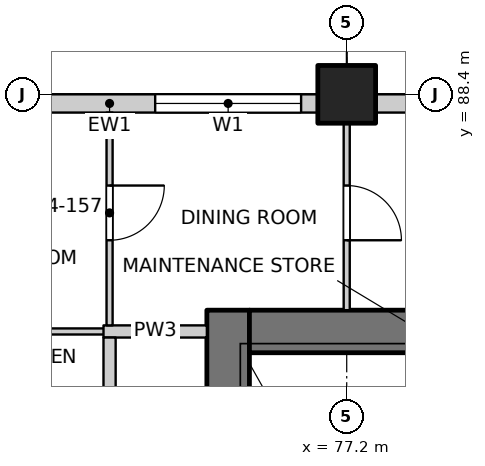
"""IFC4 building model, lengths in metres.
Left out: names, types, materials, properties, quantities, classifications, styles, units other than length and angle.
Written with IfcOpenShell. Run it as: python <this file> out.ifc"""

import sys

from ifc_helpers import new_model, si_unit, direction, frame, frame_2d, origin, origin_2d, place, context, subcontext, project, spatial, rectangle, extrude, element, fill, save


model = new_model("IFC4")
c1 = context("Model", 3, precision=1e-05, world=origin(), true_north=direction((0.0, 1.0)))
c2 = subcontext(c1, "Body", "Model", "MODEL_VIEW")
j1 = project(units=[si_unit("LENGTHUNIT", "METRE"), si_unit("PLANEANGLEUNIT", "RADIAN")], contexts=[c1])
p1 = place(None, origin())
s1 = spatial("IfcSite", under=j1, at=p1, CompositionType="ELEMENT")
p2 = place(p1, origin())
s2 = spatial("IfcBuilding", under=s1, at=p2, CompositionType="ELEMENT")
p3 = place(p2, frame((0.0, 0.0, 58.0)))
s3 = spatial("IfcBuildingStorey", under=s2, at=p3, CompositionType="ELEMENT", Elevation=58.0)
p4 = place(p3, frame((77.2, 88.4, -0.25), z_axis=(0.0, 0.0, 1.0), x_axis=(1.0, 0.0, 0.0)))
e1 = element("IfcColumn", 1, at=p4, inside=s3, PredefinedType="COLUMN", context=c2, shape_type="SweptSolid", body=[
    extrude(rectangle(XDim=0.95, YDim=0.95, at=origin_2d()), origin(), (0.0, 0.0, 1.0), 3.4),
])
p5 = place(p3, frame((75.25, 77.3, -0.25), z_axis=(0.0, 0.0, 1.0), x_axis=(0.0, 1.0, 0.0)))
e2 = element("IfcWall", 2, at=p5, inside=s3, PredefinedType="SOLIDWALL", context=c2, shape_type="SweptSolid", body=[
    extrude(rectangle(XDim=7.55, YDim=0.7, at=frame_2d((3.775, 0.0))), origin(), (0.0, 0.0, 1.0), 3.4),
])
p6 = place(p5, frame((0.3, 0.0, 0.25)))
e3 = element("IfcOpeningElement", 3, at=p6, cuts=e2, PredefinedType="OPENING", context=c2, shape_type="SweptSolid", body=[
    extrude(rectangle(XDim=1.2, YDim=2.1, at=frame_2d((0.6, 1.05))), frame((0.0, 0.36, 0.0), z_axis=(0.0, -1.0, 0.0), x_axis=(1.0, 0.0, 0.0)), (0.0, 0.0, 1.0), 0.72),
])
p7 = place(p3, frame((75.6, 84.5, -0.25), z_axis=(0.0, 0.0, 1.0), x_axis=(1.0, 0.0, 0.0)))
e4 = element("IfcWall", 4, at=p7, inside=s3, PredefinedType="SOLIDWALL", context=c2, shape_type="SweptSolid", body=[
    extrude(rectangle(XDim=18.8, YDim=0.7, at=frame_2d((9.4, 0.0))), origin(), (0.0, 0.0, 1.0), 3.4),
])
p8 = place(p3, frame((69.875, 88.25, 0.0), z_axis=(0.0, 0.0, 1.0), x_axis=(1.0, 0.0, 0.0)))
e5 = element("IfcWall", 5, at=p8, inside=s3, PredefinedType="SOLIDWALL", context=c2, shape_type="SweptSolid", body=[
    extrude(rectangle(XDim=6.85, YDim=0.3, at=frame_2d((3.425, 0.0))), origin(), (0.0, 0.0, 1.0), 2.7),
])
p9 = place(p8, frame((0.575, 0.0, 0.0)))
e6 = element("IfcOpeningElement", 6, at=p9, cuts=e5, PredefinedType="OPENING", context=c2, shape_type="SweptSolid", body=[
    extrude(rectangle(XDim=1.8, YDim=2.4, at=frame_2d((0.9, 1.2))), frame((0.0, 0.16, 0.0), z_axis=(0.0, -1.0, 0.0), x_axis=(1.0, 0.0, 0.0)), (0.0, 0.0, 1.0), 0.32),
])
p10 = place(p8, frame((4.175, 0.0, 0.9)))
e7 = element("IfcOpeningElement", 7, at=p10, cuts=e5, PredefinedType="OPENING", context=c2, shape_type="SweptSolid", body=[
    extrude(rectangle(XDim=2.4, YDim=1.8, at=frame_2d((1.2, 0.9))), frame((0.0, 0.16, 0.0), z_axis=(0.0, -1.0, 0.0), x_axis=(1.0, 0.0, 0.0)), (0.0, 0.0, 1.0), 0.32),
])
p11 = place(p3, frame((77.675, 88.25, 0.0), z_axis=(0.0, 0.0, 1.0), x_axis=(1.0, 0.0, 0.0)))
e8 = element("IfcWall", 8, at=p11, inside=s3, PredefinedType="SOLIDWALL", context=c2, shape_type="SweptSolid", body=[
    extrude(rectangle(XDim=6.85, YDim=0.3, at=frame_2d((3.425, 0.0))), origin(), (0.0, 0.0, 1.0), 2.7),
])
p12 = place(p11, frame((0.575, 0.0, 0.0)))
e9 = element("IfcOpeningElement", 9, at=p12, cuts=e8, PredefinedType="OPENING", context=c2, shape_type="SweptSolid", body=[
    extrude(rectangle(XDim=1.8, YDim=2.4, at=frame_2d((0.9, 1.2))), frame((0.0, 0.16, 0.0), z_axis=(0.0, -1.0, 0.0), x_axis=(1.0, 0.0, 0.0)), (0.0, 0.0, 1.0), 0.32),
])
p13 = place(p11, frame((4.175, 0.0, 0.9)))
e10 = element("IfcOpeningElement", 10, at=p13, cuts=e8, PredefinedType="OPENING", context=c2, shape_type="SweptSolid", body=[
    extrude(rectangle(XDim=2.4, YDim=1.8, at=frame_2d((1.2, 0.9))), frame((0.0, 0.16, 0.0), z_axis=(0.0, -1.0, 0.0), x_axis=(1.0, 0.0, 0.0)), (0.0, 0.0, 1.0), 0.32),
])
p14 = place(p3, frame((61.9, 84.5, 0.0), z_axis=(0.0, 0.0, 1.0), x_axis=(1.0, 0.0, 0.0)))
e11 = element("IfcWall", 11, at=p14, inside=s3, PredefinedType="PARTITIONING", context=c2, shape_type="SweptSolid", body=[
    extrude(rectangle(XDim=11.5, YDim=0.1, at=frame_2d((5.75, 0.0))), origin(), (0.0, 0.0, 1.0), 3.15),
])
p15 = place(p14, frame((7.965, 0.0, 0.0)))
e12 = element("IfcOpeningElement", 12, at=p15, cuts=e11, PredefinedType="OPENING", context=c2, shape_type="SweptSolid", body=[
    extrude(rectangle(XDim=0.9, YDim=2.1, at=frame_2d((0.45, 1.05))), frame((0.0, 0.06, 0.0), z_axis=(0.0, -1.0, 0.0), x_axis=(1.0, 0.0, 0.0)), (0.0, 0.0, 1.0), 0.12),
])
p16 = place(p3, frame((73.2, 84.5, 0.0), z_axis=(0.0, 0.0, 1.0), x_axis=(1.0, 0.0, 0.0)))
e13 = element("IfcWall", 13, at=p16, inside=s3, PredefinedType="PARTITIONING", context=c2, shape_type="SweptSolid", body=[
    extrude(rectangle(XDim=1.7, YDim=0.2, at=frame_2d((0.85, 0.0))), origin(), (0.0, 0.0, 1.0), 3.15),
])
p17 = place(p3, frame((73.3, 53.4, 0.0), z_axis=(0.0, 0.0, 1.0), x_axis=(0.0, 1.0, 0.0)))
e14 = element("IfcWall", 14, at=p17, inside=s3, PredefinedType="PARTITIONING", context=c2, shape_type="SweptSolid", body=[
    extrude(rectangle(XDim=31.0, YDim=0.2, at=frame_2d((15.5, 0.0))), origin(), (0.0, 0.0, 1.0), 3.15),
])
p18 = place(p17, frame((3.325, 0.0, 0.0)))
e15 = element("IfcOpeningElement", 15, at=p18, cuts=e14, PredefinedType="OPENING", context=c2, shape_type="SweptSolid", body=[
    extrude(rectangle(XDim=1.0, YDim=2.1, at=frame_2d((0.5, 1.05))), frame((0.0, 0.11, 0.0), z_axis=(0.0, -1.0, 0.0), x_axis=(1.0, 0.0, 0.0)), (0.0, 0.0, 1.0), 0.22),
])
p19 = place(p17, frame((21.675, 0.0, 0.0)))
e16 = element("IfcOpeningElement", 16, at=p19, cuts=e14, PredefinedType="OPENING", context=c2, shape_type="SweptSolid", body=[
    extrude(rectangle(XDim=1.0, YDim=2.1, at=frame_2d((0.5, 1.05))), frame((0.0, 0.11, 0.0), z_axis=(0.0, -1.0, 0.0), x_axis=(1.0, 0.0, 0.0)), (0.0, 0.0, 1.0), 0.22),
])
p20 = place(p17, frame((26.225, 0.0, 0.0)))
e17 = element("IfcOpeningElement", 17, at=p20, cuts=e14, PredefinedType="OPENING", context=c2, shape_type="SweptSolid", body=[
    extrude(rectangle(XDim=1.0, YDim=2.1, at=frame_2d((0.5, 1.05))), frame((0.0, 0.11, 0.0), z_axis=(0.0, -1.0, 0.0), x_axis=(1.0, 0.0, 0.0)), (0.0, 0.0, 1.0), 0.22),
])
p21 = place(p3, frame((73.3, 84.6, 0.0), z_axis=(0.0, 0.0, 1.0), x_axis=(0.0, 1.0, 0.0)))
e18 = element("IfcWall", 18, at=p21, inside=s3, PredefinedType="PARTITIONING", context=c2, shape_type="SweptSolid", body=[
    extrude(rectangle(XDim=3.5, YDim=0.1, at=frame_2d((1.75, 0.0))), origin(), (0.0, 0.0, 1.0), 3.15),
])
p22 = place(p21, frame((1.4, 0.0, 0.0)))
e19 = element("IfcOpeningElement", 19, at=p22, cuts=e18, PredefinedType="OPENING", context=c2, shape_type="SweptSolid", body=[
    extrude(rectangle(XDim=0.9, YDim=2.1, at=frame_2d((0.45, 1.05))), frame((0.0, 0.06, 0.0), z_axis=(0.0, -1.0, 0.0), x_axis=(1.0, 0.0, 0.0)), (0.0, 0.0, 1.0), 0.12),
])
p23 = place(p3, frame((77.2, 84.85, 0.0), z_axis=(0.0, 0.0, 1.0), x_axis=(0.0, 1.0, 0.0)))
e20 = element("IfcWall", 20, at=p23, inside=s3, PredefinedType="PARTITIONING", context=c2, shape_type="SweptSolid", body=[
    extrude(rectangle(XDim=3.25, YDim=0.1, at=frame_2d((1.625, 0.0))), origin(), (0.0, 0.0, 1.0), 3.15),
])
p24 = place(p23, frame((1.15, 0.0, 0.0)))
e21 = element("IfcOpeningElement", 21, at=p24, cuts=e20, PredefinedType="OPENING", context=c2, shape_type="SweptSolid", body=[
    extrude(rectangle(XDim=0.9, YDim=2.1, at=frame_2d((0.45, 1.05))), frame((0.0, 0.06, 0.0), z_axis=(0.0, -1.0, 0.0), x_axis=(1.0, 0.0, 0.0)), (0.0, 0.0, 1.0), 0.12),
])
p25 = place(p10, origin())
e22 = element("IfcWindow", 22, at=p25, inside=s3, PartitioningType="DOUBLE_PANEL_VERTICAL", PredefinedType="WINDOW", context=c2, shape_type="SweptSolid", body=[
    extrude(rectangle(XDim=2.4, YDim=1.8, at=frame_2d((1.2, 0.9))), frame((0.0, 0.03, 0.0), z_axis=(0.0, -1.0, 0.0), x_axis=(1.0, 0.0, 0.0)), (0.0, 0.0, 1.0), 0.06),
])
fill(e7, e22)
p26 = place(p22, origin())
e23 = element("IfcDoor", 23, at=p26, inside=s3, OperationType="SINGLE_SWING_LEFT", PredefinedType="DOOR", context=c2, shape_type="SweptSolid", body=[
    extrude(rectangle(XDim=0.9, YDim=2.1, at=frame_2d((0.45, 1.05))), frame((0.0, 0.025, 0.0), z_axis=(0.0, -1.0, 0.0), x_axis=(1.0, 0.0, 0.0)), (0.0, 0.0, 1.0), 0.05),
])
fill(e19, e23)
p27 = place(p24, origin())
e24 = element("IfcDoor", 24, at=p27, inside=s3, OperationType="SINGLE_SWING_RIGHT", PredefinedType="DOOR", context=c2, shape_type="SweptSolid", body=[
    extrude(rectangle(XDim=0.9, YDim=2.1, at=frame_2d((0.45, 1.05))), frame((0.0, 0.025, 0.0), z_axis=(0.0, -1.0, 0.0), x_axis=(1.0, 0.0, 0.0)), (0.0, 0.0, 1.0), 0.05),
])
fill(e21, e24)
save(model, sys.argv[1])
